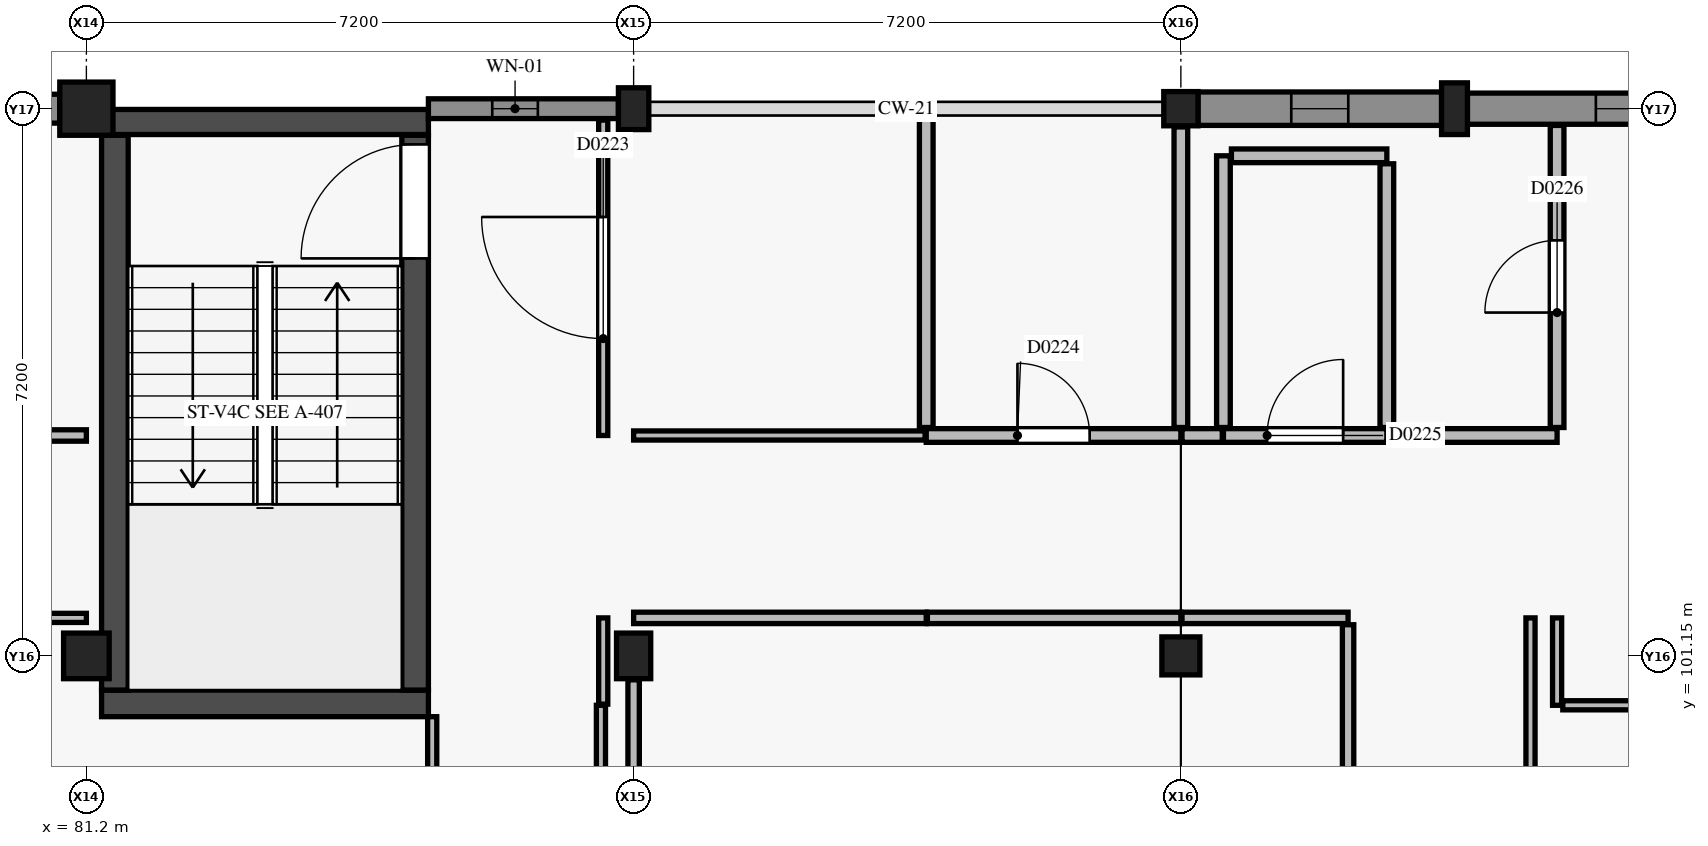
"""IFC4 building model, lengths in metres.
Left out: names, types, materials, properties, quantities, classifications, styles, units other than length and angle.
Written with IfcOpenShell. Run it as: python <this file> out.ifc"""

import sys

from ifc_helpers import new_model, si_unit, direction, frame, frame_2d, origin, origin_2d, place, context, subcontext, project, spatial, rectangle, circle, extrude, element, fill, save


model = new_model("IFC4")
c1 = context("Model", 3, precision=1e-05, world=origin(), true_north=direction((0.0, 1.0)))
c2 = subcontext(c1, "Body", "Model", "MODEL_VIEW")
j1 = project(units=[si_unit("LENGTHUNIT", "METRE"), si_unit("PLANEANGLEUNIT", "RADIAN")], contexts=[c1])
p1 = place(None, origin())
s1 = spatial("IfcSite", under=j1, at=p1, CompositionType="ELEMENT")
p2 = place(p1, origin())
s2 = spatial("IfcBuilding", under=s1, at=p2, CompositionType="ELEMENT")
p3 = place(p2, frame((0.0, 0.0, 4.8)))
s3 = spatial("IfcBuildingStorey", under=s2, at=p3, CompositionType="ELEMENT", Elevation=4.8)
p4 = place(p3, frame((81.2, 101.15, 0.0), z_axis=(0.0, 0.0, 1.0), x_axis=(1.0, 0.0, 0.0)))
e1 = element("IfcColumn", 1, at=p4, inside=s3, PredefinedType="COLUMN", context=c2, shape_type="SweptSolid", body=[
    extrude(rectangle(XDim=0.6, YDim=0.6, at=origin_2d()), origin(), (0.0, 0.0, 1.0), 4.2),
])
p5 = place(p3, frame((81.2, 108.35, 0.0), z_axis=(0.0, 0.0, 1.0), x_axis=(1.0, 0.0, 0.0)))
e2 = element("IfcColumn", 2, at=p5, inside=s3, PredefinedType="COLUMN", context=c2, shape_type="SweptSolid", body=[
    extrude(circle(Radius=0.35, at=origin_2d()), origin(), (0.0, 0.0, 1.0), 4.2),
])
p6 = place(p3, frame((88.4, 101.15, 0.0), z_axis=(0.0, 0.0, 1.0), x_axis=(1.0, 0.0, 0.0)))
e3 = element("IfcColumn", 3, at=p6, inside=s3, PredefinedType="COLUMN", context=c2, shape_type="SweptSolid", body=[
    extrude(rectangle(XDim=0.45, YDim=0.6, at=origin_2d()), origin(), (0.0, 0.0, 1.0), 4.2),
])
p7 = place(p3, frame((88.4, 108.35, 0.0), z_axis=(0.0, 0.0, 1.0), x_axis=(1.0, 0.0, 0.0)))
e4 = element("IfcColumn", 4, at=p7, inside=s3, PredefinedType="COLUMN", context=c2, shape_type="SweptSolid", body=[
    extrude(rectangle(XDim=0.4, YDim=0.55, at=origin_2d()), origin(), (0.0, 0.0, 1.0), 4.2),
])
p8 = place(p3, frame((95.6, 101.15, 0.0), z_axis=(0.0, 0.0, 1.0), x_axis=(1.0, 0.0, 0.0)))
e5 = element("IfcColumn", 5, at=p8, inside=s3, PredefinedType="COLUMN", context=c2, shape_type="SweptSolid", body=[
    extrude(rectangle(XDim=0.5, YDim=0.5, at=origin_2d()), origin(), (0.0, 0.0, 1.0), 4.2),
])
p9 = place(p3, frame((95.6, 108.35, 0.0), z_axis=(0.0, 0.0, 1.0), x_axis=(1.0, 0.0, 0.0)))
e6 = element("IfcColumn", 6, at=p9, inside=s3, PredefinedType="COLUMN", context=c2, shape_type="SweptSolid", body=[
    extrude(rectangle(XDim=0.45, YDim=0.45, at=origin_2d()), origin(), (0.0, 0.0, 1.0), 4.2),
])
p10 = place(p3, frame((99.2, 108.35, 0.0), z_axis=(0.0, 0.0, 1.0), x_axis=(1.0, 0.0, 0.0)))
e7 = element("IfcColumn", 7, at=p10, inside=s3, PredefinedType="PILASTER", context=c2, shape_type="SweptSolid", body=[
    extrude(rectangle(XDim=0.34, YDim=0.68, at=origin_2d()), origin(), (0.0, 0.0, 1.0), 4.2),
])
p11 = place(p3, frame((81.4, 100.525, 0.0), z_axis=(0.0, 0.0, 1.0), x_axis=(1.0, 0.0, 0.0)))
e8 = element("IfcWall", 8, at=p11, inside=s3, PredefinedType="SHEAR", context=c2, shape_type="SweptSolid", body=[
    extrude(rectangle(XDim=4.3, YDim=0.35, at=frame_2d((2.15, 0.0))), origin(), (0.0, 0.0, 1.0), 3.95),
])
p12 = place(p3, frame((81.4, 108.175, 0.0), z_axis=(0.0, 0.0, 1.0), x_axis=(1.0, 0.0, 0.0)))
e9 = element("IfcWall", 9, at=p12, inside=s3, PredefinedType="SHEAR", context=c2, shape_type="SweptSolid", body=[
    extrude(rectangle(XDim=4.3, YDim=0.33, at=frame_2d((2.15, 0.0))), origin(), (0.0, 0.0, 1.0), 3.95),
])
p13 = place(p3, frame((81.575, 100.7, 0.0), z_axis=(0.0, 0.0, 1.0), x_axis=(0.0, 1.0, 0.0)))
e10 = element("IfcWall", 10, at=p13, inside=s3, PredefinedType="SHEAR", context=c2, shape_type="SweptSolid", body=[
    extrude(rectangle(XDim=7.3, YDim=0.35, at=frame_2d((3.65, 0.0))), origin(), (0.0, 0.0, 1.0), 3.95),
])
p14 = place(p3, frame((85.525, 100.7, 0.0), z_axis=(0.0, 0.0, 1.0), x_axis=(0.0, 1.0, 0.0)))
e11 = element("IfcWall", 11, at=p14, inside=s3, PredefinedType="SHEAR", context=c2, shape_type="SweptSolid", body=[
    extrude(rectangle(XDim=7.3, YDim=0.35, at=frame_2d((3.65, 0.0))), origin(), (0.0, 0.0, 1.0), 3.95),
])
p15 = place(p14, frame((5.68, 0.0, 0.0)))
e12 = element("IfcOpeningElement", 12, at=p15, cuts=e11, PredefinedType="OPENING", context=c2, shape_type="SweptSolid", body=[
    extrude(rectangle(XDim=1.5, YDim=2.15, at=frame_2d((0.75, 1.075))), frame((0.0, 0.185, 0.0), z_axis=(0.0, -1.0, 0.0), x_axis=(1.0, 0.0, 0.0)), (0.0, 0.0, 1.0), 0.37),
])
p16 = place(p3, frame((74.225, 108.35, 0.0), z_axis=(0.0, 0.0, 1.0), x_axis=(1.0, 0.0, 0.0)))
e13 = element("IfcWall", 13, at=p16, inside=s3, PredefinedType="USERDEFINED", context=c2, shape_type="SweptSolid", body=[
    extrude(rectangle(XDim=6.625, YDim=0.38, at=frame_2d((3.312, 0.0))), origin(), (0.0, 0.0, 1.0), 3.13),
])
p17 = place(p16, frame((2.863, 0.0, 0.95)))
e14 = element("IfcOpeningElement", 14, at=p17, cuts=e13, PredefinedType="OPENING", context=c2, shape_type="SweptSolid", body=[
    extrude(rectangle(XDim=0.9, YDim=1.2, at=frame_2d((0.45, 0.6))), frame((0.0, 0.2, 0.0), z_axis=(0.0, -1.0, 0.0), x_axis=(1.0, 0.0, 0.0)), (0.0, 0.0, 1.0), 0.4),
])
p18 = place(p3, frame((85.7, 108.35, 0.0), z_axis=(0.0, 0.0, 1.0), x_axis=(1.0, 0.0, 0.0)))
e15 = element("IfcWall", 15, at=p18, inside=s3, PredefinedType="SOLIDWALL", context=c2, shape_type="SweptSolid", body=[
    extrude(rectangle(XDim=2.5, YDim=0.26, at=frame_2d((1.25, 0.0))), origin(), (0.0, 0.0, 1.0), 3.13),
])
p19 = place(p18, frame((0.84, 0.0, 0.9)))
e16 = element("IfcOpeningElement", 16, at=p19, cuts=e15, PredefinedType="OPENING", context=c2, shape_type="SweptSolid", body=[
    extrude(rectangle(XDim=0.6, YDim=1.8, at=frame_2d((0.3, 0.9))), frame((0.0, 0.14, 0.0), z_axis=(0.0, -1.0, 0.0), x_axis=(1.0, 0.0, 0.0)), (0.0, 0.0, 1.0), 0.28),
])
p20 = place(p3, frame((95.825, 108.35, 0.0), z_axis=(0.0, 0.0, 1.0), x_axis=(1.0, 0.0, 0.0)))
e17 = element("IfcWall", 17, at=p20, inside=s3, PredefinedType="USERDEFINED", context=c2, shape_type="SweptSolid", body=[
    extrude(rectangle(XDim=3.205, YDim=0.44, at=frame_2d((1.603, 0.0))), origin(), (0.0, 0.0, 1.0), 3.13),
])
p21 = place(p20, frame((1.228, 0.0, 0.9)))
e18 = element("IfcOpeningElement", 18, at=p21, cuts=e17, PredefinedType="OPENING", context=c2, shape_type="SweptSolid", body=[
    extrude(rectangle(XDim=0.75, YDim=1.8, at=frame_2d((0.375, 0.9))), frame((0.0, 0.23, 0.0), z_axis=(0.0, -1.0, 0.0), x_axis=(1.0, 0.0, 0.0)), (0.0, 0.0, 1.0), 0.46),
])
p22 = place(p3, frame((99.37, 108.35, 0.0), z_axis=(0.0, 0.0, 1.0), x_axis=(1.0, 0.0, 0.0)))
e19 = element("IfcWall", 19, at=p22, inside=s3, PredefinedType="USERDEFINED", context=c2, shape_type="SweptSolid", body=[
    extrude(rectangle(XDim=3.08, YDim=0.41, at=frame_2d((1.54, 0.0))), origin(), (0.0, 0.0, 1.0), 3.13),
])
p23 = place(p22, frame((1.69, 0.0, 0.9)))
e20 = element("IfcOpeningElement", 20, at=p23, cuts=e19, PredefinedType="OPENING", context=c2, shape_type="SweptSolid", body=[
    extrude(rectangle(XDim=0.9, YDim=1.8, at=frame_2d((0.45, 0.9))), frame((0.0, 0.215, 0.0), z_axis=(0.0, -1.0, 0.0), x_axis=(1.0, 0.0, 0.0)), (0.0, 0.0, 1.0), 0.43),
])
p24 = place(p3, frame((96.16, 104.05, 0.0), z_axis=(0.0, 0.0, 1.0), x_axis=(1.0, 0.0, 0.0)))
e21 = element("IfcWall", 21, at=p24, inside=s3, PredefinedType="PLUMBINGWALL", context=c2, shape_type="SweptSolid", body=[
    extrude(rectangle(XDim=2.15, YDim=0.18, at=frame_2d((1.075, 0.0))), origin(), (0.0, 0.0, 1.0), 3.95),
])
p25 = place(p24, frame((0.575, 0.0, 0.0)))
e22 = element("IfcOpeningElement", 22, at=p25, cuts=e21, PredefinedType="OPENING", context=c2, shape_type="SweptSolid", body=[
    extrude(rectangle(XDim=1.0, YDim=2.15, at=frame_2d((0.5, 1.075))), frame((0.0, 0.1, 0.0), z_axis=(0.0, -1.0, 0.0), x_axis=(1.0, 0.0, 0.0)), (0.0, 0.0, 1.0), 0.2),
])
p26 = place(p3, frame((96.16, 104.155, 0.0), z_axis=(0.0, 0.0, 1.0), x_axis=(0.0, 1.0, 0.0)))
e23 = element("IfcWall", 23, at=p26, inside=s3, PredefinedType="PLUMBINGWALL", context=c2, shape_type="SweptSolid", body=[
    extrude(rectangle(XDim=3.575, YDim=0.18, at=frame_2d((1.788, 0.0))), origin(), (0.0, 0.0, 1.0), 3.515),
])
p27 = place(p3, frame((96.265, 107.73, 0.0), z_axis=(0.0, 0.0, 1.0), x_axis=(1.0, 0.0, 0.0)))
e24 = element("IfcWall", 24, at=p27, inside=s3, PredefinedType="PLUMBINGWALL", context=c2, shape_type="SweptSolid", body=[
    extrude(rectangle(XDim=2.045, YDim=0.18, at=frame_2d((1.022, 0.0))), origin(), (0.0, 0.0, 1.0), 3.95),
])
p28 = place(p3, frame((98.31, 104.155, 0.0), z_axis=(0.0, 0.0, 1.0), x_axis=(0.0, 1.0, 0.0)))
e25 = element("IfcWall", 25, at=p28, inside=s3, PredefinedType="PLUMBINGWALL", context=c2, shape_type="SweptSolid", body=[
    extrude(rectangle(XDim=3.47, YDim=0.18, at=frame_2d((1.735, 0.0))), origin(), (0.0, 0.0, 1.0), 3.515),
])
p29 = place(p3, frame((92.25, 104.05, 0.0), z_axis=(0.0, 0.0, 1.0), x_axis=(1.0, 0.0, 0.0)))
e26 = element("IfcWall", 26, at=p29, inside=s3, PredefinedType="PLUMBINGWALL", context=c2, shape_type="SweptSolid", body=[
    extrude(rectangle(XDim=3.35, YDim=0.18, at=frame_2d((1.675, 0.0))), origin(), (0.0, 0.0, 1.0), 3.215),
])
p30 = place(p29, frame((1.2, 0.0, 0.0)))
e27 = element("IfcOpeningElement", 27, at=p30, cuts=e26, PredefinedType="OPENING", context=c2, shape_type="SweptSolid", body=[
    extrude(rectangle(XDim=0.95, YDim=2.1, at=frame_2d((0.475, 1.05))), frame((0.0, 0.1, 0.0), z_axis=(0.0, -1.0, 0.0), x_axis=(1.0, 0.0, 0.0)), (0.0, 0.0, 1.0), 0.2),
])
p31 = place(p3, frame((98.325, 104.05, 0.0), z_axis=(0.0, 0.0, 1.0), x_axis=(1.0, 0.0, 0.0)))
e28 = element("IfcWall", 28, at=p31, inside=s3, PredefinedType="PLUMBINGWALL", context=c2, shape_type="SweptSolid", body=[
    extrude(rectangle(XDim=2.225, YDim=0.18, at=frame_2d((1.113, 0.0))), origin(), (0.0, 0.0, 1.0), 3.95),
])
p32 = place(p3, frame((95.615, 104.05, 0.0), z_axis=(0.0, 0.0, 1.0), x_axis=(1.0, 0.0, 0.0)))
e29 = element("IfcWall", 29, at=p32, inside=s3, PredefinedType="PLUMBINGWALL", context=c2, shape_type="SweptSolid", body=[
    extrude(rectangle(XDim=0.53, YDim=0.18, at=frame_2d((0.265, 0.0))), origin(), (0.0, 0.0, 1.0), 3.215),
])
p33 = place(p3, frame((100.55, 104.155, 0.0), z_axis=(0.0, 0.0, 1.0), x_axis=(0.0, 1.0, 0.0)))
e30 = element("IfcWall", 30, at=p33, inside=s3, PredefinedType="PLUMBINGWALL", context=c2, shape_type="SweptSolid", body=[
    extrude(rectangle(XDim=3.975, YDim=0.18, at=frame_2d((1.987, 0.0))), origin(), (0.0, 0.0, 1.0), 3.515),
])
p34 = place(p33, frame((1.512, 0.0, 0.0)))
e31 = element("IfcOpeningElement", 31, at=p34, cuts=e30, PredefinedType="OPENING", context=c2, shape_type="SweptSolid", body=[
    extrude(rectangle(XDim=0.95, YDim=2.1, at=frame_2d((0.475, 1.05))), frame((0.0, 0.1, 0.0), z_axis=(0.0, -1.0, 0.0), x_axis=(1.0, 0.0, 0.0)), (0.0, 0.0, 1.0), 0.2),
])
p35 = place(p3, frame((88.4, 101.65, 0.0), z_axis=(0.0, 0.0, 1.0), x_axis=(1.0, 0.0, 0.0)))
e32 = element("IfcWall", 32, at=p35, inside=s3, PredefinedType="PARTITIONING", context=c2, shape_type="SweptSolid", body=[
    extrude(rectangle(XDim=3.85, YDim=0.15, at=frame_2d((1.925, 0.0))), origin(), (0.0, 0.0, 1.0), 3.355),
])
p36 = place(p3, frame((92.265, 101.65, 0.0), z_axis=(0.0, 0.0, 1.0), x_axis=(1.0, 0.0, 0.0)))
e33 = element("IfcWall", 33, at=p36, inside=s3, PredefinedType="PARTITIONING", context=c2, shape_type="SweptSolid", body=[
    extrude(rectangle(XDim=3.335, YDim=0.15, at=frame_2d((1.667, 0.0))), origin(), (0.0, 0.0, 1.0), 3.215),
])
p37 = place(p3, frame((95.615, 101.65, 0.0), z_axis=(0.0, 0.0, 1.0), x_axis=(1.0, 0.0, 0.0)))
e34 = element("IfcWall", 34, at=p37, inside=s3, PredefinedType="PARTITIONING", context=c2, shape_type="SweptSolid", body=[
    extrude(rectangle(XDim=2.185, YDim=0.15, at=frame_2d((1.093, 0.0))), origin(), (0.0, 0.0, 1.0), 3.215),
])
p38 = place(p3, frame((97.8, 94.4, 0.0), z_axis=(0.0, 0.0, 1.0), x_axis=(0.0, 1.0, 0.0)))
e35 = element("IfcWall", 35, at=p38, inside=s3, PredefinedType="PARTITIONING", context=c2, shape_type="SweptSolid", body=[
    extrude(rectangle(XDim=7.16, YDim=0.15, at=frame_2d((3.58, 0.0))), origin(), (0.0, 0.0, 1.0), 3.355),
])
p39 = place(p38, frame((3.105, 0.0, 0.0)))
e36 = element("IfcOpeningElement", 36, at=p39, cuts=e35, PredefinedType="OPENING", context=c2, shape_type="SweptSolid", body=[
    extrude(rectangle(XDim=0.95, YDim=2.1, at=frame_2d((0.475, 1.05))), frame((0.0, 0.085, 0.0), z_axis=(0.0, -1.0, 0.0), x_axis=(1.0, 0.0, 0.0)), (0.0, 0.0, 1.0), 0.17),
])
p40 = place(p3, frame((74.015, 104.05, 0.0), z_axis=(0.0, 0.0, 1.0), x_axis=(1.0, 0.0, 0.0)))
e37 = element("IfcWall", 37, at=p40, inside=s3, PredefinedType="PARTITIONING", context=c2, shape_type="SweptSolid", body=[
    extrude(rectangle(XDim=7.185, YDim=0.15, at=frame_2d((3.593, 0.0))), origin(), (0.0, 0.0, 1.0), 3.215),
])
p41 = place(p40, frame((3.117, 0.0, 0.0)))
e38 = element("IfcOpeningElement", 38, at=p41, cuts=e37, PredefinedType="OPENING", context=c2, shape_type="SweptSolid", body=[
    extrude(rectangle(XDim=0.95, YDim=2.1, at=frame_2d((0.475, 1.05))), frame((0.0, 0.085, 0.0), z_axis=(0.0, -1.0, 0.0), x_axis=(1.0, 0.0, 0.0)), (0.0, 0.0, 1.0), 0.17),
])
for number, where, z_axis, x_axis in (
    (39, (87.97, 99.365, 0.0), (0.0, 0.0, 1.0), (0.0, 1.0, 0.0)),
    (40, (88.0, 100.515, 0.0), (0.0, 0.0, 1.0), (0.0, 1.0, 0.0)),
):
    element("IfcWall", number, at=place(p3, frame(where, z_axis=z_axis, x_axis=x_axis)), inside=s3, PredefinedType="PARTITIONING", context=c2, shape_type="SweptSolid", body=[
        extrude(rectangle(XDim=1.135, YDim=0.12, at=frame_2d((0.567, 0.0))), origin(), (0.0, 0.0, 1.0), 3.95),
    ])
p42 = place(p3, frame((85.75, 91.55, 0.0), z_axis=(0.0, 0.0, 1.0), x_axis=(0.0, 1.0, 0.0)))
e41 = element("IfcWall", 41, at=p42, inside=s3, PredefinedType="PARTITIONING", context=c2, shape_type="SweptSolid", body=[
    extrude(rectangle(XDim=8.8, YDim=0.12, at=frame_2d((4.4, 0.0))), origin(), (0.0, 0.0, 1.0), 3.285),
])
p43 = place(p3, frame((80.275, 101.65, 0.0), z_axis=(0.0, 0.0, 1.0), x_axis=(1.0, 0.0, 0.0)))
e42 = element("IfcWall", 42, at=p43, inside=s3, PredefinedType="PARTITIONING", context=c2, shape_type="SweptSolid", body=[
    extrude(rectangle(XDim=0.925, YDim=0.12, at=frame_2d((0.462, 0.0))), origin(), (0.0, 0.0, 1.0), 3.215),
])
p44 = place(p3, frame((100.55, 100.5, 0.0), z_axis=(0.0, 0.0, 1.0), x_axis=(0.0, 1.0, 0.0)))
e43 = element("IfcWall", 43, at=p44, inside=s3, PredefinedType="PARTITIONING", context=c2, shape_type="SweptSolid", body=[
    extrude(rectangle(XDim=1.15, YDim=0.12, at=frame_2d((0.575, 0.0))), origin(), (0.0, 0.0, 1.0), 3.355),
])
p45 = place(p3, frame((100.625, 100.5, 0.0), z_axis=(0.0, 0.0, 1.0), x_axis=(1.0, 0.0, 0.0)))
e44 = element("IfcWall", 44, at=p45, inside=s3, PredefinedType="PARTITIONING", context=c2, shape_type="SweptSolid", body=[
    extrude(rectangle(XDim=2.175, YDim=0.12, at=frame_2d((1.087, 0.0))), origin(), (0.0, 0.0, 1.0), 3.285),
])
p46 = place(p3, frame((100.2, 98.825, 0.0), z_axis=(0.0, 0.0, 1.0), x_axis=(0.0, 1.0, 0.0)))
e45 = element("IfcWall", 45, at=p46, inside=s3, PredefinedType="PARTITIONING", context=c2, shape_type="SweptSolid", body=[
    extrude(rectangle(XDim=2.825, YDim=0.12, at=frame_2d((1.413, 0.0))), origin(), (0.0, 0.0, 1.0), 3.355),
])
p47 = place(p3, frame((88.0, 104.05, 0.0), z_axis=(0.0, 0.0, 1.0), x_axis=(0.0, 1.0, 0.0)))
e46 = element("IfcWall", 46, at=p47, inside=s3, PredefinedType="PARTITIONING", context=c2, shape_type="SweptSolid", body=[
    extrude(rectangle(XDim=4.15, YDim=0.12, at=frame_2d((2.075, 0.0))), origin(), (0.0, 0.0, 1.0), 3.95),
])
p48 = place(p47, frame((1.275, 0.0, 0.0)))
e47 = element("IfcOpeningElement", 47, at=p48, cuts=e46, PredefinedType="OPENING", context=c2, shape_type="SweptSolid", body=[
    extrude(rectangle(XDim=1.6, YDim=2.25, at=frame_2d((0.8, 1.125))), frame((0.0, 0.07, 0.0), z_axis=(0.0, -1.0, 0.0), x_axis=(1.0, 0.0, 0.0)), (0.0, 0.0, 1.0), 0.14),
])
p49 = place(p3, frame((88.4, 104.05, 0.0), z_axis=(0.0, 0.0, 1.0), x_axis=(1.0, 0.0, 0.0)))
e48 = element("IfcWall", 48, at=p49, inside=s3, PredefinedType="PARTITIONING", context=c2, shape_type="SweptSolid", body=[
    extrude(rectangle(XDim=3.835, YDim=0.12, at=frame_2d((1.917, 0.0))), origin(), (0.0, 0.0, 1.0), 3.355),
])
p50 = place(p3, frame((92.25, 104.155, 0.0), z_axis=(0.0, 0.0, 1.0), x_axis=(0.0, 1.0, 0.0)))
e49 = element("IfcWall", 49, at=p50, inside=s3, PredefinedType="PLUMBINGWALL", context=c2, shape_type="SweptSolid", body=[
    extrude(rectangle(XDim=4.09, YDim=0.18, at=frame_2d((2.045, 0.0))), origin(), (0.0, 0.0, 1.0), 3.475),
])
p51 = place(p3, frame((95.6, 104.155, 0.0), z_axis=(0.0, 0.0, 1.0), x_axis=(0.0, 1.0, 0.0)))
e50 = element("IfcWall", 50, at=p51, inside=s3, PredefinedType="PLUMBINGWALL", context=c2, shape_type="SweptSolid", body=[
    extrude(rectangle(XDim=3.955, YDim=0.18, at=frame_2d((1.978, 0.0))), origin(), (0.0, 0.0, 1.0), 3.215),
])
p52 = place(p3, frame((88.4, 99.465, 0.0), z_axis=(0.0, 0.0, 1.0), x_axis=(0.0, 1.0, 0.0)))
e51 = element("IfcWall", 51, at=p52, inside=s3, PredefinedType="PARTITIONING", context=c2, shape_type="SweptSolid", body=[
    extrude(rectangle(XDim=1.37, YDim=0.15, at=frame_2d((0.685, 0.0))), origin(), (0.0, 0.0, 1.0), 3.355),
])
p53 = place(p19, origin())
e52 = element("IfcWindow", 52, at=p53, inside=s3, PartitioningType="SINGLE_PANEL", PredefinedType="WINDOW", context=c2, shape_type="SweptSolid", body=[
    extrude(rectangle(XDim=0.6, YDim=1.8, at=frame_2d((0.3, 0.9))), frame((0.0, 0.03, 0.0), z_axis=(0.0, -1.0, 0.0), x_axis=(1.0, 0.0, 0.0)), (0.0, 0.0, 1.0), 0.06),
])
fill(e16, e52)
p54 = place(p21, origin())
e53 = element("IfcWindow", 53, at=p54, inside=s3, PartitioningType="SINGLE_PANEL", PredefinedType="WINDOW", context=c2, shape_type="SweptSolid", body=[
    extrude(rectangle(XDim=0.75, YDim=1.8, at=frame_2d((0.375, 0.9))), frame((0.0, 0.03, 0.0), z_axis=(0.0, -1.0, 0.0), x_axis=(1.0, 0.0, 0.0)), (0.0, 0.0, 1.0), 0.06),
])
fill(e18, e53)
p55 = place(p23, origin())
e54 = element("IfcWindow", 54, at=p55, inside=s3, PartitioningType="SINGLE_PANEL", PredefinedType="WINDOW", context=c2, shape_type="SweptSolid", body=[
    extrude(rectangle(XDim=0.9, YDim=1.8, at=frame_2d((0.45, 0.9))), frame((0.0, 0.03, 0.0), z_axis=(0.0, -1.0, 0.0), x_axis=(1.0, 0.0, 0.0)), (0.0, 0.0, 1.0), 0.06),
])
fill(e20, e54)
p56 = place(p15, origin())
e55 = element("IfcDoor", 55, at=p56, inside=s3, OperationType="SINGLE_SWING_LEFT", PredefinedType="DOOR", context=c2, shape_type="SweptSolid", body=[
    extrude(rectangle(XDim=1.5, YDim=2.15, at=frame_2d((0.75, 1.075))), frame((0.0, 0.025, 0.0), z_axis=(0.0, -1.0, 0.0), x_axis=(1.0, 0.0, 0.0)), (0.0, 0.0, 1.0), 0.05),
])
fill(e12, e55)
p57 = place(p48, origin())
e56 = element("IfcDoor", 56, at=p57, inside=s3, OperationType="SINGLE_SWING_RIGHT", PredefinedType="DOOR", context=c2, shape_type="SweptSolid", body=[
    extrude(rectangle(XDim=1.6, YDim=2.25, at=frame_2d((0.8, 1.125))), frame((0.0, 0.025, 0.0), z_axis=(0.0, -1.0, 0.0), x_axis=(1.0, 0.0, 0.0)), (0.0, 0.0, 1.0), 0.05),
])
fill(e47, e56)
p58 = place(p30, origin())
e57 = element("IfcDoor", 57, at=p58, inside=s3, OperationType="SINGLE_SWING_LEFT", PredefinedType="DOOR", context=c2, shape_type="SweptSolid", body=[
    extrude(rectangle(XDim=0.95, YDim=2.1, at=frame_2d((0.475, 1.05))), frame((0.0, 0.025, 0.0), z_axis=(0.0, -1.0, 0.0), x_axis=(1.0, 0.0, 0.0)), (0.0, 0.0, 1.0), 0.05),
])
fill(e27, e57)
p59 = place(p25, origin())
e58 = element("IfcDoor", 58, at=p59, inside=s3, OperationType="SINGLE_SWING_RIGHT", PredefinedType="DOOR", context=c2, shape_type="SweptSolid", body=[
    extrude(rectangle(XDim=1.0, YDim=2.15, at=frame_2d((0.5, 1.075))), frame((0.0, 0.025, 0.0), z_axis=(0.0, -1.0, 0.0), x_axis=(1.0, 0.0, 0.0)), (0.0, 0.0, 1.0), 0.05),
])
fill(e22, e58)
p60 = place(p34, origin())
e59 = element("IfcDoor", 59, at=p60, inside=s3, OperationType="SINGLE_SWING_LEFT", PredefinedType="DOOR", context=c2, shape_type="SweptSolid", body=[
    extrude(rectangle(XDim=0.95, YDim=2.1, at=frame_2d((0.475, 1.05))), frame((0.0, 0.025, 0.0), z_axis=(0.0, -1.0, 0.0), x_axis=(1.0, 0.0, 0.0)), (0.0, 0.0, 1.0), 0.05),
])
fill(e31, e59)
save(model, sys.argv[1])
